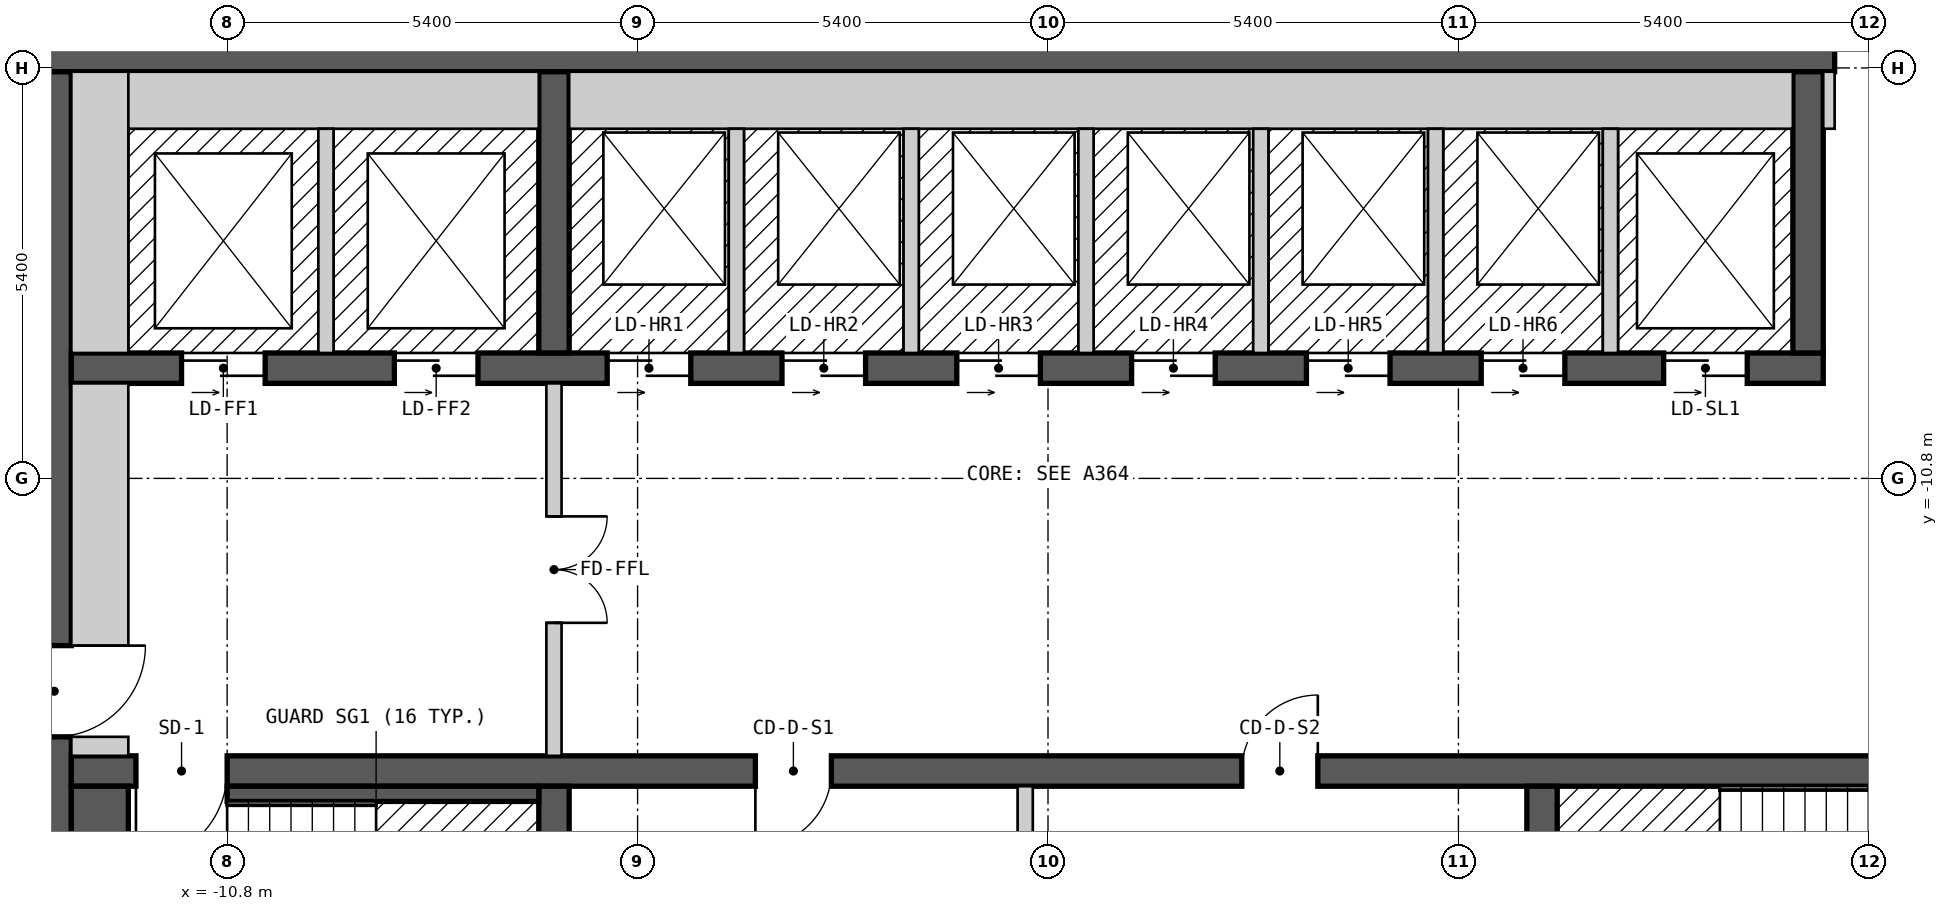
"""IFC4 building model, lengths in metres.
Left out: names, types, materials, properties, quantities, classifications, styles, units other than length and angle.
Written with IfcOpenShell. Run it as: python <this file> out.ifc"""

import sys

from ifc_helpers import new_model, si_unit, direction, frame, frame_2d, origin, place, context, subcontext, project, spatial, rectangle, extrude, element, fill, save


model = new_model("IFC4")
c1 = context("Model", 3, precision=1e-05, world=origin(), true_north=direction((0.0, 1.0)))
c2 = subcontext(c1, "Body", "Model", "MODEL_VIEW")
j1 = project(units=[si_unit("LENGTHUNIT", "METRE"), si_unit("PLANEANGLEUNIT", "RADIAN")], contexts=[c1])
p1 = place(None, origin())
s1 = spatial("IfcSite", under=j1, at=p1, CompositionType="ELEMENT")
p2 = place(p1, origin())
s2 = spatial("IfcBuilding", under=s1, at=p2, CompositionType="ELEMENT")
p3 = place(p2, frame((0.0, 0.0, 235.8)))
s3 = spatial("IfcBuildingStorey", under=s2, at=p3, CompositionType="ELEMENT", Elevation=235.8)
p4 = place(p3, frame((-13.3, -5.225, 0.0), z_axis=(0.0, 0.0, 1.0), x_axis=(1.0, 0.0, 0.0)))
e1 = element("IfcWall", 1, at=p4, inside=s3, PredefinedType="SHEAR", context=c2, shape_type="SweptSolid", body=[
    extrude(rectangle(XDim=26.6, YDim=0.45, at=frame_2d((13.3, 0.0))), origin(), (0.0, 0.0, 1.0), 2.7),
])
p5 = place(p4, frame((23.65, 0.0, 0.0)))
e2 = element("IfcOpeningElement", 2, at=p5, cuts=e1, PredefinedType="OPENING", context=c2, shape_type="SweptSolid", body=[
    extrude(rectangle(XDim=1.2, YDim=2.1, at=frame_2d((0.6, 1.05))), frame((0.0, 0.235, 0.0), z_axis=(0.0, -1.0, 0.0), x_axis=(1.0, 0.0, 0.0)), (0.0, 0.0, 1.0), 0.47),
])
p6 = place(p3, frame((-13.075, -18.55, 0.0), z_axis=(0.0, 0.0, 1.0), x_axis=(0.0, 1.0, 0.0)))
e3 = element("IfcWall", 3, at=p6, inside=s3, PredefinedType="SHEAR", context=c2, shape_type="SweptSolid", body=[
    extrude(rectangle(XDim=13.1, YDim=0.45, at=frame_2d((6.55, 0.0))), origin(), (0.0, 0.0, 1.0), 2.7),
])
p7 = place(p6, frame((4.35, 0.0, 0.0)))
e4 = element("IfcOpeningElement", 4, at=p7, cuts=e3, PredefinedType="OPENING", context=c2, shape_type="SweptSolid", body=[
    extrude(rectangle(XDim=1.2, YDim=2.1, at=frame_2d((0.6, 1.05))), frame((0.0, 0.235, 0.0), z_axis=(0.0, -1.0, 0.0), x_axis=(1.0, 0.0, 0.0)), (0.0, 0.0, 1.0), 0.47),
])
p8 = place(p3, frame((-12.85, -14.65, 0.0), z_axis=(0.0, 0.0, 1.0), x_axis=(1.0, 0.0, 0.0)))
e5 = element("IfcWall", 5, at=p8, inside=s3, PredefinedType="SHEAR", context=c2, shape_type="SweptSolid", body=[
    extrude(rectangle(XDim=25.7, YDim=0.4, at=frame_2d((12.85, 0.0))), origin(), (0.0, 0.0, 1.0), 2.7),
])
p9 = place(p8, frame((2.05, 0.0, 0.0), z_axis=(0.0, 0.0, 1.0), x_axis=(-1.0, 0.0, 0.0)))
e6 = element("IfcOpeningElement", 6, at=p9, cuts=e5, PredefinedType="OPENING", context=c2, shape_type="SweptSolid", body=[
    extrude(rectangle(XDim=1.2, YDim=2.1, at=frame_2d((0.6, 1.05))), frame((0.0, 0.21, 0.0), z_axis=(0.0, -1.0, 0.0), x_axis=(1.0, 0.0, 0.0)), (0.0, 0.0, 1.0), 0.42),
])
p10 = place(p8, frame((24.9, 0.0, 0.0), z_axis=(0.0, 0.0, 1.0), x_axis=(-1.0, 0.0, 0.0)))
e7 = element("IfcOpeningElement", 7, at=p10, cuts=e5, PredefinedType="OPENING", context=c2, shape_type="SweptSolid", body=[
    extrude(rectangle(XDim=1.2, YDim=2.1, at=frame_2d((0.6, 1.05))), frame((0.0, 0.21, 0.0), z_axis=(0.0, -1.0, 0.0), x_axis=(1.0, 0.0, 0.0)), (0.0, 0.0, 1.0), 0.42),
])
p11 = place(p8, frame((10.0, 0.0, 0.0), z_axis=(0.0, 0.0, 1.0), x_axis=(-1.0, 0.0, 0.0)))
e8 = element("IfcOpeningElement", 8, at=p11, cuts=e5, PredefinedType="OPENING", context=c2, shape_type="SweptSolid", body=[
    extrude(rectangle(XDim=1.0, YDim=2.1, at=frame_2d((0.5, 1.05))), frame((0.0, 0.21, 0.0), z_axis=(0.0, -1.0, 0.0), x_axis=(1.0, 0.0, 0.0)), (0.0, 0.0, 1.0), 0.42),
])
p12 = place(p8, frame((16.4, 0.0, 0.0), z_axis=(0.0, 0.0, 1.0), x_axis=(-1.0, 0.0, 0.0)))
e9 = element("IfcOpeningElement", 9, at=p12, cuts=e5, PredefinedType="OPENING", context=c2, shape_type="SweptSolid", body=[
    extrude(rectangle(XDim=1.0, YDim=2.1, at=frame_2d((0.5, 1.05))), frame((0.0, 0.21, 0.0), z_axis=(0.0, -1.0, 0.0), x_axis=(1.0, 0.0, 0.0)), (0.0, 0.0, 1.0), 0.42),
])
p13 = place(p3, frame((-12.85, -9.35, 0.0), z_axis=(0.0, 0.0, 1.0), x_axis=(1.0, 0.0, 0.0)))
e10 = element("IfcWall", 10, at=p13, inside=s3, PredefinedType="SHEAR", context=c2, shape_type="SweptSolid", body=[
    extrude(rectangle(XDim=23.05, YDim=0.4, at=frame_2d((11.525, 0.0))), origin(), (0.0, 0.0, 1.0), 2.7),
])
p14 = place(p13, frame((1.45, 0.0, 0.0)))
e11 = element("IfcOpeningElement", 11, at=p14, cuts=e10, PredefinedType="OPENING", context=c2, shape_type="SweptSolid", body=[
    extrude(rectangle(XDim=1.1, YDim=2.1, at=frame_2d((0.55, 1.05))), frame((0.0, 0.21, 0.0), z_axis=(0.0, -1.0, 0.0), x_axis=(1.0, 0.0, 0.0)), (0.0, 0.0, 1.0), 0.42),
])
p15 = place(p13, frame((4.25, 0.0, 0.0)))
e12 = element("IfcOpeningElement", 12, at=p15, cuts=e10, PredefinedType="OPENING", context=c2, shape_type="SweptSolid", body=[
    extrude(rectangle(XDim=1.1, YDim=2.1, at=frame_2d((0.55, 1.05))), frame((0.0, 0.21, 0.0), z_axis=(0.0, -1.0, 0.0), x_axis=(1.0, 0.0, 0.0)), (0.0, 0.0, 1.0), 0.42),
])
p16 = place(p13, frame((7.05, 0.0, 0.0)))
e13 = element("IfcOpeningElement", 13, at=p16, cuts=e10, PredefinedType="OPENING", context=c2, shape_type="SweptSolid", body=[
    extrude(rectangle(XDim=1.1, YDim=2.1, at=frame_2d((0.55, 1.05))), frame((0.0, 0.21, 0.0), z_axis=(0.0, -1.0, 0.0), x_axis=(1.0, 0.0, 0.0)), (0.0, 0.0, 1.0), 0.42),
])
p17 = place(p13, frame((9.35, 0.0, 0.0)))
e14 = element("IfcOpeningElement", 14, at=p17, cuts=e10, PredefinedType="OPENING", context=c2, shape_type="SweptSolid", body=[
    extrude(rectangle(XDim=1.1, YDim=2.1, at=frame_2d((0.55, 1.05))), frame((0.0, 0.21, 0.0), z_axis=(0.0, -1.0, 0.0), x_axis=(1.0, 0.0, 0.0)), (0.0, 0.0, 1.0), 0.42),
])
p18 = place(p13, frame((11.65, 0.0, 0.0)))
e15 = element("IfcOpeningElement", 15, at=p18, cuts=e10, PredefinedType="OPENING", context=c2, shape_type="SweptSolid", body=[
    extrude(rectangle(XDim=1.1, YDim=2.1, at=frame_2d((0.55, 1.05))), frame((0.0, 0.21, 0.0), z_axis=(0.0, -1.0, 0.0), x_axis=(1.0, 0.0, 0.0)), (0.0, 0.0, 1.0), 0.42),
])
p19 = place(p13, frame((13.95, 0.0, 0.0)))
e16 = element("IfcOpeningElement", 16, at=p19, cuts=e10, PredefinedType="OPENING", context=c2, shape_type="SweptSolid", body=[
    extrude(rectangle(XDim=1.1, YDim=2.1, at=frame_2d((0.55, 1.05))), frame((0.0, 0.21, 0.0), z_axis=(0.0, -1.0, 0.0), x_axis=(1.0, 0.0, 0.0)), (0.0, 0.0, 1.0), 0.42),
])
p20 = place(p13, frame((16.25, 0.0, 0.0)))
e17 = element("IfcOpeningElement", 17, at=p20, cuts=e10, PredefinedType="OPENING", context=c2, shape_type="SweptSolid", body=[
    extrude(rectangle(XDim=1.1, YDim=2.1, at=frame_2d((0.55, 1.05))), frame((0.0, 0.21, 0.0), z_axis=(0.0, -1.0, 0.0), x_axis=(1.0, 0.0, 0.0)), (0.0, 0.0, 1.0), 0.42),
])
p21 = place(p13, frame((18.55, 0.0, 0.0)))
e18 = element("IfcOpeningElement", 18, at=p21, cuts=e10, PredefinedType="OPENING", context=c2, shape_type="SweptSolid", body=[
    extrude(rectangle(XDim=1.1, YDim=2.1, at=frame_2d((0.55, 1.05))), frame((0.0, 0.21, 0.0), z_axis=(0.0, -1.0, 0.0), x_axis=(1.0, 0.0, 0.0)), (0.0, 0.0, 1.0), 0.42),
])
p22 = place(p13, frame((20.95, 0.0, 0.0)))
e19 = element("IfcOpeningElement", 19, at=p22, cuts=e10, PredefinedType="OPENING", context=c2, shape_type="SweptSolid", body=[
    extrude(rectangle(XDim=1.1, YDim=2.1, at=frame_2d((0.55, 1.05))), frame((0.0, 0.21, 0.0), z_axis=(0.0, -1.0, 0.0), x_axis=(1.0, 0.0, 0.0)), (0.0, 0.0, 1.0), 0.42),
])
for number, where, z_axis, x_axis in (
    (20, (-6.5, -18.55, 0.0), (0.0, 0.0, 1.0), (0.0, 1.0, 0.0)),
    (21, (6.5, -18.55, 0.0), (0.0, 0.0, 1.0), (0.0, 1.0, 0.0)),
    (22, (-6.5, -9.15, 0.0), (0.0, 0.0, 1.0), (0.0, 1.0, 0.0)),
    (23, (10.0, -9.15, 0.0), (0.0, 0.0, 1.0), (0.0, 1.0, 0.0)),
):
    element("IfcWall", number, at=place(p3, frame(where, z_axis=z_axis, x_axis=x_axis)), inside=s3, PredefinedType="SHEAR", context=c2, shape_type="SweptSolid", body=[
        extrude(rectangle(XDim=3.7, YDim=0.4, at=frame_2d((1.85, 0.0))), origin(), (0.0, 0.0, 1.0), 2.7),
    ])
p23 = place(p3, frame((-12.475, -18.55, 0.0), z_axis=(0.0, 0.0, 1.0), x_axis=(0.0, 1.0, 0.0)))
e24 = element("IfcWall", 24, at=p23, inside=s3, PredefinedType="SOLIDWALL", context=c2, shape_type="SweptSolid", body=[
    extrude(rectangle(XDim=3.7, YDim=0.75, at=frame_2d((1.85, 0.0))), origin(), (0.0, 0.0, 1.0), 2.7),
])
p24 = place(p3, frame((-12.85, -14.325, 0.0), z_axis=(0.0, 0.0, 1.0), x_axis=(1.0, 0.0, 0.0)))
e25 = element("IfcWall", 25, at=p24, inside=s3, PredefinedType="PARTITIONING", context=c2, shape_type="SweptSolid", body=[
    extrude(rectangle(XDim=0.75, YDim=0.25, at=frame_2d((0.375, 0.0))), origin(), (0.0, 0.0, 1.0), 2.7),
])
p25 = place(p3, frame((-12.475, -13.0, 0.0), z_axis=(0.0, 0.0, 1.0), x_axis=(0.0, 1.0, 0.0)))
e26 = element("IfcWall", 26, at=p25, inside=s3, PredefinedType="PARTITIONING", context=c2, shape_type="SweptSolid", body=[
    extrude(rectangle(XDim=3.45, YDim=0.75, at=frame_2d((1.725, 0.0))), origin(), (0.0, 0.0, 1.0), 2.7),
])
p26 = place(p3, frame((-12.475, -9.15, 0.0), z_axis=(0.0, 0.0, 1.0), x_axis=(0.0, 1.0, 0.0)))
e27 = element("IfcWall", 27, at=p26, inside=s3, PredefinedType="SOLIDWALL", context=c2, shape_type="SweptSolid", body=[
    extrude(rectangle(XDim=3.7, YDim=0.75, at=frame_2d((1.85, 0.0))), origin(), (0.0, 0.0, 1.0), 2.7),
])
p27 = place(p3, frame((-12.1, -5.825, 0.0), z_axis=(0.0, 0.0, 1.0), x_axis=(1.0, 0.0, 0.0)))
e28 = element("IfcWall", 28, at=p27, inside=s3, PredefinedType="SOLIDWALL", context=c2, shape_type="SweptSolid", body=[
    extrude(rectangle(XDim=5.4, YDim=0.75, at=frame_2d((2.7, 0.0))), origin(), (0.0, 0.0, 1.0), 2.7),
])
p28 = place(p3, frame((-10.8, -14.95, 0.0), z_axis=(0.0, 0.0, 1.0), x_axis=(1.0, 0.0, 0.0)))
e29 = element("IfcWall", 29, at=p28, inside=s3, PredefinedType="SOLIDWALL", context=c2, shape_type="SweptSolid", body=[
    extrude(rectangle(XDim=4.1, YDim=0.2, at=frame_2d((2.05, 0.0))), origin(), (0.0, 0.0, 1.0), 2.7),
])
p29 = place(p3, frame((-9.5, -9.15, 0.0), z_axis=(0.0, 0.0, 1.0), x_axis=(0.0, 1.0, 0.0)))
e30 = element("IfcWall", 30, at=p29, inside=s3, PredefinedType="SOLIDWALL", context=c2, shape_type="SweptSolid", body=[
    extrude(rectangle(XDim=2.95, YDim=0.2, at=frame_2d((1.475, 0.0))), origin(), (0.0, 0.0, 1.0), 2.7),
])
p30 = place(p3, frame((-6.5, -14.45, 0.0), z_axis=(0.0, 0.0, 1.0), x_axis=(0.0, 1.0, 0.0)))
e31 = element("IfcWall", 31, at=p30, inside=s3, PredefinedType="PARTITIONING", context=c2, shape_type="SweptSolid", body=[
    extrude(rectangle(XDim=4.9, YDim=0.2, at=frame_2d((2.45, 0.0))), origin(), (0.0, 0.0, 1.0), 2.7),
])
p31 = place(p30, frame((3.15, 0.0, 0.0), z_axis=(0.0, 0.0, 1.0), x_axis=(-1.0, 0.0, 0.0)))
e32 = element("IfcOpeningElement", 32, at=p31, cuts=e31, PredefinedType="OPENING", context=c2, shape_type="SweptSolid", body=[
    extrude(rectangle(XDim=1.4, YDim=2.1, at=frame_2d((0.7, 1.05))), frame((0.0, 0.11, 0.0), z_axis=(0.0, -1.0, 0.0), x_axis=(1.0, 0.0, 0.0)), (0.0, 0.0, 1.0), 0.22),
])
p32 = place(p3, frame((-6.3, -5.825, 0.0), z_axis=(0.0, 0.0, 1.0), x_axis=(1.0, 0.0, 0.0)))
e33 = element("IfcWall", 33, at=p32, inside=s3, PredefinedType="SOLIDWALL", context=c2, shape_type="SweptSolid", body=[
    extrude(rectangle(XDim=16.1, YDim=0.75, at=frame_2d((8.05, 0.0))), origin(), (0.0, 0.0, 1.0), 2.7),
])
for number, where, z_axis, x_axis in (
    (34, (-4.1, -9.15, 0.0), (0.0, 0.0, 1.0), (0.0, 1.0, 0.0)),
    (35, (-1.8, -9.15, 0.0), (0.0, 0.0, 1.0), (0.0, 1.0, 0.0)),
):
    element("IfcWall", number, at=place(p3, frame(where, z_axis=z_axis, x_axis=x_axis)), inside=s3, PredefinedType="SOLIDWALL", context=c2, shape_type="SweptSolid", body=[
        extrude(rectangle(XDim=2.95, YDim=0.2, at=frame_2d((1.475, 0.0))), origin(), (0.0, 0.0, 1.0), 2.7),
    ])
p33 = place(p3, frame((-0.3, -17.8, 0.0), z_axis=(0.0, 0.0, 1.0), x_axis=(0.0, 1.0, 0.0)))
e36 = element("IfcWall", 36, at=p33, inside=s3, PredefinedType="PARTITIONING", context=c2, shape_type="SweptSolid", body=[
    extrude(rectangle(XDim=2.95, YDim=0.2, at=frame_2d((1.475, 0.0))), origin(), (0.0, 0.0, 1.0), 2.7),
])
for number, where, z_axis, x_axis in (
    (37, (0.5, -9.15, 0.0), (0.0, 0.0, 1.0), (0.0, 1.0, 0.0)),
    (38, (2.8, -9.15, 0.0), (0.0, 0.0, 1.0), (0.0, 1.0, 0.0)),
    (39, (5.1, -9.15, 0.0), (0.0, 0.0, 1.0), (0.0, 1.0, 0.0)),
    (40, (7.4, -9.15, 0.0), (0.0, 0.0, 1.0), (0.0, 1.0, 0.0)),
):
    element("IfcWall", number, at=place(p3, frame(where, z_axis=z_axis, x_axis=x_axis)), inside=s3, PredefinedType="SOLIDWALL", context=c2, shape_type="SweptSolid", body=[
        extrude(rectangle(XDim=2.95, YDim=0.2, at=frame_2d((1.475, 0.0))), origin(), (0.0, 0.0, 1.0), 2.7),
    ])
p34 = place(p3, frame((10.275, -6.2, 0.0), z_axis=(0.0, 0.0, 1.0), x_axis=(0.0, 1.0, 0.0)))
e41 = element("IfcWall", 41, at=p34, inside=s3, PredefinedType="PARTITIONING", context=c2, shape_type="SweptSolid", body=[
    extrude(rectangle(XDim=0.75, YDim=0.15, at=frame_2d((0.375, 0.0))), origin(), (0.0, 0.0, 1.0), 2.7),
])
p35 = place(p14, origin())
e42 = element("IfcDoor", 42, at=p35, inside=s3, OperationType="DOUBLE_DOOR_SLIDING", PredefinedType="DOOR", context=c2, shape_type="SweptSolid", body=[
    extrude(rectangle(XDim=1.1, YDim=2.1, at=frame_2d((0.55, 1.05))), frame((0.0, 0.025, 0.0), z_axis=(0.0, -1.0, 0.0), x_axis=(1.0, 0.0, 0.0)), (0.0, 0.0, 1.0), 0.05),
])
fill(e11, e42)
p36 = place(p15, origin())
e43 = element("IfcDoor", 43, at=p36, inside=s3, OperationType="DOUBLE_DOOR_SLIDING", PredefinedType="DOOR", context=c2, shape_type="SweptSolid", body=[
    extrude(rectangle(XDim=1.1, YDim=2.1, at=frame_2d((0.55, 1.05))), frame((0.0, 0.025, 0.0), z_axis=(0.0, -1.0, 0.0), x_axis=(1.0, 0.0, 0.0)), (0.0, 0.0, 1.0), 0.05),
])
fill(e12, e43)
p37 = place(p16, origin())
e44 = element("IfcDoor", 44, at=p37, inside=s3, OperationType="DOUBLE_DOOR_SLIDING", PredefinedType="DOOR", context=c2, shape_type="SweptSolid", body=[
    extrude(rectangle(XDim=1.1, YDim=2.1, at=frame_2d((0.55, 1.05))), frame((0.0, 0.025, 0.0), z_axis=(0.0, -1.0, 0.0), x_axis=(1.0, 0.0, 0.0)), (0.0, 0.0, 1.0), 0.05),
])
fill(e13, e44)
p38 = place(p17, origin())
e45 = element("IfcDoor", 45, at=p38, inside=s3, OperationType="DOUBLE_DOOR_SLIDING", PredefinedType="DOOR", context=c2, shape_type="SweptSolid", body=[
    extrude(rectangle(XDim=1.1, YDim=2.1, at=frame_2d((0.55, 1.05))), frame((0.0, 0.025, 0.0), z_axis=(0.0, -1.0, 0.0), x_axis=(1.0, 0.0, 0.0)), (0.0, 0.0, 1.0), 0.05),
])
fill(e14, e45)
p39 = place(p18, origin())
e46 = element("IfcDoor", 46, at=p39, inside=s3, OperationType="DOUBLE_DOOR_SLIDING", PredefinedType="DOOR", context=c2, shape_type="SweptSolid", body=[
    extrude(rectangle(XDim=1.1, YDim=2.1, at=frame_2d((0.55, 1.05))), frame((0.0, 0.025, 0.0), z_axis=(0.0, -1.0, 0.0), x_axis=(1.0, 0.0, 0.0)), (0.0, 0.0, 1.0), 0.05),
])
fill(e15, e46)
p40 = place(p19, origin())
e47 = element("IfcDoor", 47, at=p40, inside=s3, OperationType="DOUBLE_DOOR_SLIDING", PredefinedType="DOOR", context=c2, shape_type="SweptSolid", body=[
    extrude(rectangle(XDim=1.1, YDim=2.1, at=frame_2d((0.55, 1.05))), frame((0.0, 0.025, 0.0), z_axis=(0.0, -1.0, 0.0), x_axis=(1.0, 0.0, 0.0)), (0.0, 0.0, 1.0), 0.05),
])
fill(e16, e47)
p41 = place(p20, origin())
e48 = element("IfcDoor", 48, at=p41, inside=s3, OperationType="DOUBLE_DOOR_SLIDING", PredefinedType="DOOR", context=c2, shape_type="SweptSolid", body=[
    extrude(rectangle(XDim=1.1, YDim=2.1, at=frame_2d((0.55, 1.05))), frame((0.0, 0.025, 0.0), z_axis=(0.0, -1.0, 0.0), x_axis=(1.0, 0.0, 0.0)), (0.0, 0.0, 1.0), 0.05),
])
fill(e17, e48)
p42 = place(p21, origin())
e49 = element("IfcDoor", 49, at=p42, inside=s3, OperationType="DOUBLE_DOOR_SLIDING", PredefinedType="DOOR", context=c2, shape_type="SweptSolid", body=[
    extrude(rectangle(XDim=1.1, YDim=2.1, at=frame_2d((0.55, 1.05))), frame((0.0, 0.025, 0.0), z_axis=(0.0, -1.0, 0.0), x_axis=(1.0, 0.0, 0.0)), (0.0, 0.0, 1.0), 0.05),
])
fill(e18, e49)
p43 = place(p22, origin())
e50 = element("IfcDoor", 50, at=p43, inside=s3, OperationType="DOUBLE_DOOR_SLIDING", PredefinedType="DOOR", context=c2, shape_type="SweptSolid", body=[
    extrude(rectangle(XDim=1.1, YDim=2.1, at=frame_2d((0.55, 1.05))), frame((0.0, 0.025, 0.0), z_axis=(0.0, -1.0, 0.0), x_axis=(1.0, 0.0, 0.0)), (0.0, 0.0, 1.0), 0.05),
])
fill(e19, e50)
p44 = place(p9, origin())
e51 = element("IfcDoor", 51, at=p44, inside=s3, OperationType="SINGLE_SWING_RIGHT", PredefinedType="DOOR", context=c2, shape_type="SweptSolid", body=[
    extrude(rectangle(XDim=1.2, YDim=2.1, at=frame_2d((0.6, 1.05))), frame((0.0, 0.025, 0.0), z_axis=(0.0, -1.0, 0.0), x_axis=(1.0, 0.0, 0.0)), (0.0, 0.0, 1.0), 0.05),
])
fill(e6, e51)
p45 = place(p7, origin())
e52 = element("IfcDoor", 52, at=p45, inside=s3, OperationType="SINGLE_SWING_RIGHT", PredefinedType="DOOR", context=c2, shape_type="SweptSolid", body=[
    extrude(rectangle(XDim=1.2, YDim=2.1, at=frame_2d((0.6, 1.05))), frame((0.0, 0.025, 0.0), z_axis=(0.0, -1.0, 0.0), x_axis=(1.0, 0.0, 0.0)), (0.0, 0.0, 1.0), 0.05),
])
fill(e4, e52)
p46 = place(p31, origin())
e53 = element("IfcDoor", 53, at=p46, inside=s3, OperationType="DOUBLE_DOOR_SINGLE_SWING", PredefinedType="DOOR", context=c2, shape_type="SweptSolid", body=[
    extrude(rectangle(XDim=1.4, YDim=2.1, at=frame_2d((0.7, 1.05))), frame((0.0, 0.025, 0.0), z_axis=(0.0, -1.0, 0.0), x_axis=(1.0, 0.0, 0.0)), (0.0, 0.0, 1.0), 0.05),
])
fill(e32, e53)
p47 = place(p5, origin())
e54 = element("IfcDoor", 54, at=p47, inside=s3, OperationType="DOUBLE_DOOR_SINGLE_SWING", PredefinedType="DOOR", context=c2, shape_type="SweptSolid", body=[
    extrude(rectangle(XDim=1.2, YDim=2.1, at=frame_2d((0.6, 1.05))), frame((0.0, 0.025, 0.0), z_axis=(0.0, -1.0, 0.0), x_axis=(1.0, 0.0, 0.0)), (0.0, 0.0, 1.0), 0.05),
])
fill(e2, e54)
p48 = place(p11, origin())
e55 = element("IfcDoor", 55, at=p48, inside=s3, OperationType="SINGLE_SWING_RIGHT", PredefinedType="DOOR", context=c2, shape_type="SweptSolid", body=[
    extrude(rectangle(XDim=1.0, YDim=2.1, at=frame_2d((0.5, 1.05))), frame((0.0, 0.025, 0.0), z_axis=(0.0, -1.0, 0.0), x_axis=(1.0, 0.0, 0.0)), (0.0, 0.0, 1.0), 0.05),
])
fill(e8, e55)
p49 = place(p12, origin())
e56 = element("IfcDoor", 56, at=p49, inside=s3, OperationType="SINGLE_SWING_LEFT", PredefinedType="DOOR", context=c2, shape_type="SweptSolid", body=[
    extrude(rectangle(XDim=1.0, YDim=2.1, at=frame_2d((0.5, 1.05))), frame((0.0, 0.025, 0.0), z_axis=(0.0, -1.0, 0.0), x_axis=(1.0, 0.0, 0.0)), (0.0, 0.0, 1.0), 0.05),
])
fill(e9, e56)
save(model, sys.argv[1])
